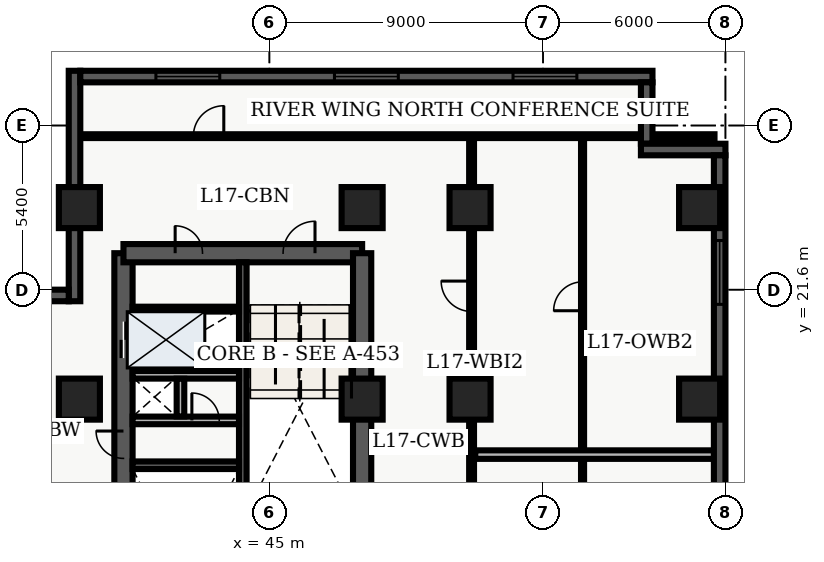
"""IFC4 building model, lengths in metres.
Left out: names, types, materials, properties, quantities, classifications, styles, units other than length and angle.
Written with IfcOpenShell. Run it as: python <this file> out.ifc"""

import sys

from ifc_helpers import new_model, entity, si_unit, converted_unit, direction, frame, origin_with_axes, origin_2d_with_axis, place, context, subcontext, project, spatial, polyline, rectangle, outline, extrude, element, fill, save


model = new_model("IFC4")
c1 = context("Model", 3, precision=1e-05, world=origin_with_axes(), true_north=direction((0.0, 1.0)))
c2 = subcontext(c1, "Body", "Model", "MODEL_VIEW")
j1 = project(units=[si_unit("LENGTHUNIT", "METRE"), converted_unit("PLANEANGLEUNIT", "DEGREE", entity("IfcPlaneAngleMeasure", 0.017), si_unit("PLANEANGLEUNIT", "RADIAN"), dimensions=[0, 0, 0, 0, 0, 0, 0])], contexts=[c1])
p1 = place(None, origin_with_axes())
s1 = spatial("IfcSite", under=j1, at=p1, CompositionType="ELEMENT")
p2 = place(p1, origin_with_axes())
s2 = spatial("IfcBuilding", under=s1, at=p2, CompositionType="ELEMENT")
p3 = place(p2, frame((0.0, 0.0, 71.7), z_axis=(0.0, 0.0, 1.0), x_axis=(1.0, 0.0, 0.0)))
s3 = spatial("IfcBuildingStorey", under=s2, at=p3, CompositionType="ELEMENT", Elevation=71.7)
p4 = place(p3, frame((40.2, 7.2, 0.0), z_axis=(0.0, 0.0, 1.0), x_axis=(0.0, 1.0, 0.0)))
e1 = element("IfcWall", 1, at=p4, inside=s3, PredefinedType="SHEAR", context=c2, shape_type="SweptSolid", body=[
    extrude(outline(polyline([(0.0, -0.3), (15.6, -0.3), (15.6, 0.3), (0.0, 0.3), (0.0, -0.3)])), origin_with_axes(), (0.0, 0.0, 1.0), 3.66),
])
p5 = place(p4, frame((12.75, 0.0, 0.0), z_axis=(0.0, 0.0, 1.0), x_axis=(1.0, 0.0, 0.0)))
e2 = element("IfcOpeningElement", 2, at=p5, cuts=e1, PredefinedType="OPENING", context=c2, shape_type="SweptSolid", body=[
    extrude(rectangle(XDim=1.2, YDim=0.62, at=origin_2d_with_axis()), origin_with_axes(), (0.0, 0.0, 1.0), 2.15),
])
p6 = place(p4, frame((9.3, 0.0, 0.0), z_axis=(0.0, 0.0, 1.0), x_axis=(1.0, 0.0, 0.0)))
e3 = element("IfcOpeningElement", 3, at=p6, cuts=e1, PredefinedType="OPENING", context=c2, shape_type="SweptSolid", body=[
    extrude(rectangle(XDim=0.9, YDim=0.62, at=origin_2d_with_axis()), origin_with_axes(), (0.0, 0.0, 1.0), 2.15),
])
p7 = place(p3, frame((40.2, 22.8, 0.0), z_axis=(0.0, 0.0, 1.0), x_axis=(1.0, 0.0, 0.0)))
e4 = element("IfcWall", 4, at=p7, inside=s3, PredefinedType="SHEAR", context=c2, shape_type="SweptSolid", body=[
    extrude(outline(polyline([(0.0, -0.3), (7.85, -0.3), (7.85, 0.3), (0.0, 0.3), (0.0, -0.3)])), origin_with_axes(), (0.0, 0.0, 1.0), 3.66),
])
p8 = place(p7, frame((5.775, 0.0, 0.0), z_axis=(0.0, 0.0, 1.0), x_axis=(1.0, 0.0, 0.0)))
e5 = element("IfcOpeningElement", 5, at=p8, cuts=e4, PredefinedType="OPENING", context=c2, shape_type="SweptSolid", body=[
    extrude(rectangle(XDim=1.05, YDim=0.62, at=origin_2d_with_axis()), origin_with_axes(), (0.0, 0.0, 1.0), 2.15),
])
p9 = place(p7, frame((2.15, 0.0, 0.0), z_axis=(0.0, 0.0, 1.0), x_axis=(1.0, 0.0, 0.0)))
e6 = element("IfcOpeningElement", 6, at=p9, cuts=e4, PredefinedType="OPENING", context=c2, shape_type="SweptSolid", body=[
    extrude(rectangle(XDim=0.9, YDim=0.62, at=origin_2d_with_axis()), origin_with_axes(), (0.0, 0.0, 1.0), 2.15),
])
p10 = place(p3, frame((48.05, 7.2, 0.0), z_axis=(0.0, 0.0, 1.0), x_axis=(0.0, 1.0, 0.0)))
e7 = element("IfcWall", 7, at=p10, inside=s3, PredefinedType="SHEAR", context=c2, shape_type="SweptSolid", body=[
    extrude(outline(polyline([(0.0, -0.3), (15.6, -0.3), (15.6, 0.3), (0.0, 0.3), (0.0, -0.3)])), origin_with_axes(), (0.0, 0.0, 1.0), 3.66),
])
p11 = place(p10, frame((1.425, 0.0, 0.0), z_axis=(0.0, 0.0, 1.0), x_axis=(1.0, 0.0, 0.0)))
e8 = element("IfcOpeningElement", 8, at=p11, cuts=e7, PredefinedType="OPENING", context=c2, shape_type="SweptSolid", body=[
    extrude(rectangle(XDim=1.05, YDim=0.62, at=origin_2d_with_axis()), origin_with_axes(), (0.0, 0.0, 1.0), 2.15),
])
p12 = place(p10, frame((3.475, 0.0, 0.0), z_axis=(0.0, 0.0, 1.0), x_axis=(1.0, 0.0, 0.0)))
e9 = element("IfcOpeningElement", 9, at=p12, cuts=e7, PredefinedType="OPENING", context=c2, shape_type="SweptSolid", body=[
    extrude(rectangle(XDim=1.05, YDim=0.62, at=origin_2d_with_axis()), origin_with_axes(), (0.0, 0.0, 1.0), 2.15),
])
p13 = place(p10, frame((5.625, 0.0, 0.0), z_axis=(0.0, 0.0, 1.0), x_axis=(1.0, 0.0, 0.0)))
e10 = element("IfcOpeningElement", 10, at=p13, cuts=e7, PredefinedType="OPENING", context=c2, shape_type="SweptSolid", body=[
    extrude(rectangle(XDim=0.95, YDim=0.62, at=origin_2d_with_axis()), origin_with_axes(), (0.0, 0.0, 1.0), 2.15),
])
p14 = place(p3, frame((44.125, 7.5, 0.0), z_axis=(0.0, 0.0, 1.0), x_axis=(0.0, 1.0, 0.0)))
e11 = element("IfcWall", 11, at=p14, inside=s3, PredefinedType="SHEAR", context=c2, shape_type="SweptSolid", body=[
    extrude(outline(polyline([(0.0, -0.125), (15.0, -0.125), (15.0, 0.125), (0.0, 0.125), (0.0, -0.125)])), origin_with_axes(), (0.0, 0.0, 1.0), 3.66),
])
p15 = place(p3, frame((40.5, 15.825, 0.0), z_axis=(0.0, 0.0, 1.0), x_axis=(1.0, 0.0, 0.0)))
e12 = element("IfcWall", 12, at=p15, inside=s3, PredefinedType="SHEAR", context=c2, shape_type="SweptSolid", body=[
    extrude(outline(polyline([(0.0, -0.125), (3.5, -0.125), (3.5, 0.125), (0.0, 0.125), (0.0, -0.125)])), origin_with_axes(), (0.0, 0.0, 1.0), 3.66),
])
p16 = place(p3, frame((40.5, 17.3, 0.0), z_axis=(0.0, 0.0, 1.0), x_axis=(1.0, 0.0, 0.0)))
e13 = element("IfcWall", 13, at=p16, inside=s3, PredefinedType="SOLIDWALL", context=c2, shape_type="SweptSolid", body=[
    extrude(outline(polyline([(0.0, -0.125), (3.5, -0.125), (3.5, 0.125), (0.0, 0.125), (0.0, -0.125)])), origin_with_axes(), (0.0, 0.0, 1.0), 2.7),
])
p17 = place(p16, frame((2.4, 0.0, 0.0), z_axis=(0.0, 0.0, 1.0), x_axis=(1.0, 0.0, 0.0)))
e14 = element("IfcOpeningElement", 14, at=p17, cuts=e13, PredefinedType="OPENING", context=c2, shape_type="SweptSolid", body=[
    extrude(rectangle(XDim=0.9, YDim=0.27, at=origin_2d_with_axis()), origin_with_axes(), (0.0, 0.0, 1.0), 2.15),
])
p18 = place(p3, frame((40.5, 18.8, 0.0), z_axis=(0.0, 0.0, 1.0), x_axis=(1.0, 0.0, 0.0)))
e15 = element("IfcWall", 15, at=p18, inside=s3, PredefinedType="SOLIDWALL", context=c2, shape_type="SweptSolid", body=[
    extrude(outline(polyline([(0.0, -0.125), (3.5, -0.125), (3.5, 0.125), (0.0, 0.125), (0.0, -0.125)])), origin_with_axes(), (0.0, 0.0, 1.0), 2.7),
])
p19 = place(p3, frame((42.075, 17.43, 0.0), z_axis=(0.0, 0.0, 1.0), x_axis=(0.0, 1.0, 0.0)))
e16 = element("IfcWall", 16, at=p19, inside=s3, PredefinedType="SOLIDWALL", context=c2, shape_type="SweptSolid", body=[
    extrude(outline(polyline([(0.0, -0.125), (1.24, -0.125), (1.24, 0.125), (0.0, 0.125), (0.0, -0.125)])), origin_with_axes(), (0.0, 0.0, 1.0), 2.7),
])
for number, where, z_axis, x_axis in (
    (17, (38.75, 18.0, 0.0), (0.0, 0.0, 1.0), (1.0, 0.0, 0.0)),
    (18, (38.75, 24.3, 0.0), (0.0, 0.0, 1.0), (1.0, 0.0, 0.0)),
    (19, (48.05, 18.0, 0.0), (0.0, 0.0, 1.0), (1.0, 0.0, 0.0)),
    (20, (48.05, 24.3, 0.0), (0.0, 0.0, 1.0), (1.0, 0.0, 0.0)),
    (21, (51.6, 18.0, 0.0), (0.0, 0.0, 1.0), (1.0, 0.0, 0.0)),
    (22, (51.6, 24.3, 0.0), (0.0, 0.0, 1.0), (1.0, 0.0, 0.0)),
    (23, (59.15, 18.0, 0.0), (0.0, 0.0, 1.0), (1.0, 0.0, 0.0)),
    (24, (59.15, 24.3, 0.0), (0.0, 0.0, 1.0), (1.0, 0.0, 0.0)),
):
    element("IfcColumn", number, at=place(p3, frame(where, z_axis=z_axis, x_axis=x_axis)), inside=s3, PredefinedType="COLUMN", context=c2, shape_type="SweptSolid", body=[
        extrude(rectangle(XDim=1.35, YDim=1.35, at=origin_2d_with_axis()), origin_with_axes(), (0.0, 0.0, 1.0), 3.9),
    ])
p20 = place(p3, frame((40.5, 20.96, 0.0), z_axis=(0.0, 0.0, 1.0), x_axis=(1.0, 0.0, 0.0)))
e25 = element("IfcWall", 25, at=p20, inside=s3, PredefinedType="PARTITIONING", context=c2, shape_type="SweptSolid", body=[
    extrude(outline(polyline([(0.0, -0.08), (3.5, -0.08), (3.5, 0.08), (0.0, 0.08), (0.0, -0.08)])), origin_with_axes(), (0.0, 0.0, 1.0), 2.7),
])
p21 = place(p3, frame((51.65, 7.85, 0.0), z_axis=(0.0, 0.0, 1.0), x_axis=(0.0, 1.0, 0.0)))
e26 = element("IfcWall", 26, at=p21, inside=s3, PredefinedType="PARTITIONING", context=c2, shape_type="SweptSolid", body=[
    extrude(outline(polyline([(0.0, -0.08), (18.8, -0.08), (18.8, 0.08), (0.0, 0.08), (0.0, -0.08)])), origin_with_axes(), (0.0, 0.0, 1.0), 2.7),
])
p22 = place(p21, frame((4.473, 0.0, 0.0), z_axis=(0.0, 0.0, 1.0), x_axis=(1.0, 0.0, 0.0)))
e27 = element("IfcOpeningElement", 27, at=p22, cuts=e26, PredefinedType="OPENING", context=c2, shape_type="SweptSolid", body=[
    extrude(rectangle(XDim=1.0, YDim=0.18, at=origin_2d_with_axis()), origin_with_axes(), (0.0, 0.0, 1.0), 2.15),
])
p23 = place(p21, frame((13.533, 0.0, 0.0), z_axis=(0.0, 0.0, 1.0), x_axis=(1.0, 0.0, 0.0)))
e28 = element("IfcOpeningElement", 28, at=p23, cuts=e26, PredefinedType="OPENING", context=c2, shape_type="SweptSolid", body=[
    extrude(rectangle(XDim=1.0, YDim=0.18, at=origin_2d_with_axis()), origin_with_axes(), (0.0, 0.0, 1.0), 2.15),
])
p24 = place(p3, frame((38.76, 26.65, 0.0), z_axis=(0.0, 0.0, 1.0), x_axis=(1.0, 0.0, 0.0)))
e29 = element("IfcWall", 29, at=p24, inside=s3, PredefinedType="PARTITIONING", context=c2, shape_type="SweptSolid", body=[
    extrude(outline(polyline([(0.0, -0.062), (20.88, -0.062), (20.88, 0.062), (0.0, 0.062), (0.0, -0.062)])), origin_with_axes(), (0.0, 0.0, 1.0), 2.7),
])
p25 = place(p24, frame((4.24, 0.0, 0.0), z_axis=(0.0, 0.0, 1.0), x_axis=(1.0, 0.0, 0.0)))
e30 = element("IfcOpeningElement", 30, at=p25, cuts=e29, PredefinedType="OPENING", context=c2, shape_type="SweptSolid", body=[
    extrude(rectangle(XDim=1.0, YDim=0.145, at=origin_2d_with_axis()), origin_with_axes(), (0.0, 0.0, 1.0), 2.15),
])
p26 = place(p3, frame((55.3, 7.98, 0.0), z_axis=(0.0, 0.0, 1.0), x_axis=(0.0, 1.0, 0.0)))
e31 = element("IfcWall", 31, at=p26, inside=s3, PredefinedType="PARTITIONING", context=c2, shape_type="SweptSolid", body=[
    extrude(outline(polyline([(0.0, -0.05), (18.54, -0.05), (18.54, 0.05), (0.0, 0.05), (0.0, -0.05)])), origin_with_axes(), (0.0, 0.0, 1.0), 2.7),
])
p27 = place(p26, frame((4.062, 0.0, 0.0), z_axis=(0.0, 0.0, 1.0), x_axis=(1.0, 0.0, 0.0)))
e32 = element("IfcOpeningElement", 32, at=p27, cuts=e31, PredefinedType="OPENING", context=c2, shape_type="SweptSolid", body=[
    extrude(rectangle(XDim=0.95, YDim=0.12, at=origin_2d_with_axis()), origin_with_axes(), (0.0, 0.0, 1.0), 2.15),
])
p28 = place(p26, frame((13.402, 0.0, 0.0), z_axis=(0.0, 0.0, 1.0), x_axis=(1.0, 0.0, 0.0)))
e33 = element("IfcOpeningElement", 33, at=p28, cuts=e31, PredefinedType="OPENING", context=c2, shape_type="SweptSolid", body=[
    extrude(rectangle(XDim=0.95, YDim=0.12, at=origin_2d_with_axis()), origin_with_axes(), (0.0, 0.0, 1.0), 2.15),
])
p29 = place(p3, frame((51.77, 16.175, 0.0), z_axis=(0.0, 0.0, 1.0), x_axis=(1.0, 0.0, 0.0)))
e34 = element("IfcWall", 34, at=p29, inside=s3, PredefinedType="PARTITIONING", context=c2, shape_type="SweptSolid", body=[
    extrude(outline(polyline([(0.0, -0.14), (7.855, -0.14), (7.855, 0.14), (0.0, 0.14), (0.0, -0.14)])), origin_with_axes(), (0.0, 0.0, 1.0), 2.7),
])
p30 = place(p3, frame((38.59, 21.22, 0.0), z_axis=(0.0, 0.0, 1.0), x_axis=(0.0, 1.0, 0.0)))
e35 = element("IfcWall", 35, at=p30, inside=s3, PredefinedType="SOLIDWALL", context=c2, shape_type="SweptSolid", body=[
    extrude(outline(polyline([(0.0, -0.19), (7.58, -0.19), (7.58, 0.19), (0.0, 0.19), (0.0, -0.19)])), origin_with_axes(), (0.0, 0.0, 1.0), 3.66),
])
p31 = place(p3, frame((38.78, 28.61, 0.0), z_axis=(0.0, 0.0, 1.0), x_axis=(1.0, 0.0, 0.0)))
e36 = element("IfcWall", 36, at=p31, inside=s3, PredefinedType="SOLIDWALL", context=c2, shape_type="SweptSolid", body=[
    extrude(outline(polyline([(0.0, -0.19), (18.82, -0.19), (18.82, 0.19), (0.0, 0.19), (0.0, -0.19)])), origin_with_axes(), (0.0, 0.0, 1.0), 3.66),
])
p32 = place(p31, frame((3.537, 0.0, 0.45), z_axis=(0.0, 0.0, 1.0), x_axis=(1.0, 0.0, 0.0)))
e37 = element("IfcOpeningElement", 37, at=p32, cuts=e36, PredefinedType="OPENING", context=c2, shape_type="SweptSolid", body=[
    extrude(rectangle(XDim=2.1, YDim=0.4, at=origin_2d_with_axis()), origin_with_axes(), (0.0, 0.0, 1.0), 2.2),
])
p33 = place(p31, frame((9.41, 0.0, 0.45), z_axis=(0.0, 0.0, 1.0), x_axis=(1.0, 0.0, 0.0)))
e38 = element("IfcOpeningElement", 38, at=p33, cuts=e36, PredefinedType="OPENING", context=c2, shape_type="SweptSolid", body=[
    extrude(rectangle(XDim=2.1, YDim=0.4, at=origin_2d_with_axis()), origin_with_axes(), (0.0, 0.0, 1.0), 2.2),
])
p34 = place(p31, frame((15.283, 0.0, 0.45), z_axis=(0.0, 0.0, 1.0), x_axis=(1.0, 0.0, 0.0)))
e39 = element("IfcOpeningElement", 39, at=p34, cuts=e36, PredefinedType="OPENING", context=c2, shape_type="SweptSolid", body=[
    extrude(rectangle(XDim=2.1, YDim=0.4, at=origin_2d_with_axis()), origin_with_axes(), (0.0, 0.0, 1.0), 2.2),
])
p35 = place(p3, frame((57.41, 28.42, 0.0), z_axis=(0.0, 0.0, 1.0), x_axis=(0.0, -1.0, 0.0)))
e40 = element("IfcWall", 40, at=p35, inside=s3, PredefinedType="SOLIDWALL", context=c2, shape_type="SweptSolid", body=[
    extrude(outline(polyline([(0.0, -0.19), (2.02, -0.19), (2.02, 0.19), (0.0, 0.19), (0.0, -0.19)])), origin_with_axes(), (0.0, 0.0, 1.0), 3.66),
])
p36 = place(p3, frame((57.22, 26.21, 0.0), z_axis=(0.0, 0.0, 1.0), x_axis=(1.0, 0.0, 0.0)))
e41 = element("IfcWall", 41, at=p36, inside=s3, PredefinedType="SOLIDWALL", context=c2, shape_type="SweptSolid", body=[
    extrude(outline(polyline([(0.0, -0.19), (2.78, -0.19), (2.78, 0.19), (0.0, 0.19), (0.0, -0.19)])), origin_with_axes(), (0.0, 0.0, 1.0), 3.66),
])
p37 = place(p3, frame((59.81, 26.02, 0.0), z_axis=(0.0, 0.0, 1.0), x_axis=(0.0, -1.0, 0.0)))
e42 = element("IfcWall", 42, at=p37, inside=s3, PredefinedType="SOLIDWALL", context=c2, shape_type="SweptSolid", body=[
    extrude(outline(polyline([(0.0, -0.19), (23.62, -0.19), (23.62, 0.19), (0.0, 0.19), (0.0, -0.19)])), origin_with_axes(), (0.0, 0.0, 1.0), 3.66),
])
p38 = place(p37, frame((3.853, 0.0, 0.45), z_axis=(0.0, 0.0, 1.0), x_axis=(1.0, 0.0, 0.0)))
e43 = element("IfcOpeningElement", 43, at=p38, cuts=e42, PredefinedType="OPENING", context=c2, shape_type="SweptSolid", body=[
    extrude(rectangle(XDim=2.1, YDim=0.4, at=origin_2d_with_axis()), origin_with_axes(), (0.0, 0.0, 1.0), 2.2),
])
p39 = place(p37, frame((20.218, 0.0, 0.45), z_axis=(0.0, 0.0, 1.0), x_axis=(1.0, 0.0, 0.0)))
e44 = element("IfcOpeningElement", 44, at=p39, cuts=e42, PredefinedType="OPENING", context=c2, shape_type="SweptSolid", body=[
    extrude(rectangle(XDim=2.1, YDim=0.4, at=origin_2d_with_axis()), origin_with_axes(), (0.0, 0.0, 1.0), 2.2),
])
p40 = place(p3, frame((21.22, 21.41, 0.0), z_axis=(0.0, 0.0, 1.0), x_axis=(1.0, 0.0, 0.0)))
e45 = element("IfcWall", 45, at=p40, inside=s3, PredefinedType="SOLIDWALL", context=c2, shape_type="SweptSolid", body=[
    extrude(outline(polyline([(0.0, -0.19), (17.18, -0.19), (17.18, 0.19), (0.0, 0.19), (0.0, -0.19)])), origin_with_axes(), (0.0, 0.0, 1.0), 3.66),
])
p41 = place(p40, frame((8.59, 0.0, 0.45), z_axis=(0.0, 0.0, 1.0), x_axis=(1.0, 0.0, 0.0)))
e46 = element("IfcOpeningElement", 46, at=p41, cuts=e45, PredefinedType="OPENING", context=c2, shape_type="SweptSolid", body=[
    extrude(rectangle(XDim=2.1, YDim=0.4, at=origin_2d_with_axis()), origin_with_axes(), (0.0, 0.0, 1.0), 2.2),
])
p42 = place(p40, frame((13.467, 0.0, 0.45), z_axis=(0.0, 0.0, 1.0), x_axis=(1.0, 0.0, 0.0)))
e47 = element("IfcOpeningElement", 47, at=p42, cuts=e45, PredefinedType="OPENING", context=c2, shape_type="SweptSolid", body=[
    extrude(rectangle(XDim=2.1, YDim=0.4, at=origin_2d_with_axis()), origin_with_axes(), (0.0, 0.0, 1.0), 2.2),
])
p43 = place(p4, frame((12.75, 0.0, 0.0), z_axis=(0.0, 0.0, 1.0), x_axis=(1.0, 0.0, 0.0)))
e48 = element("IfcDoor", 48, at=p43, inside=s3, OperationType="DOUBLE_DOOR_SLIDING", PredefinedType="DOOR", context=c2, shape_type="SweptSolid", body=[
    extrude(rectangle(XDim=1.2, YDim=0.09, at=origin_2d_with_axis()), origin_with_axes(), (0.0, 0.0, 1.0), 2.15),
])
fill(e2, e48)
p44 = place(p4, frame((9.3, 0.0, 0.0), z_axis=(0.0, 0.0, 1.0), x_axis=(1.0, 0.0, 0.0)))
e49 = element("IfcDoor", 49, at=p44, inside=s3, OperationType="SINGLE_SWING_RIGHT", PredefinedType="DOOR", context=c2, shape_type="SweptSolid", body=[
    extrude(rectangle(XDim=0.9, YDim=0.09, at=origin_2d_with_axis()), origin_with_axes(), (0.0, 0.0, 1.0), 2.15),
])
fill(e3, e49)
p45 = place(p16, frame((2.4, 0.0, 0.0), z_axis=(0.0, 0.0, 1.0), x_axis=(1.0, 0.0, 0.0)))
e50 = element("IfcDoor", 50, at=p45, inside=s3, OperationType="SINGLE_SWING_LEFT", PredefinedType="DOOR", context=c2, shape_type="SweptSolid", body=[
    extrude(rectangle(XDim=0.9, YDim=0.09, at=origin_2d_with_axis()), origin_with_axes(), (0.0, 0.0, 1.0), 2.15),
])
fill(e14, e50)
p46 = place(p7, frame((5.775, 0.0, 0.0), z_axis=(0.0, 0.0, 1.0), x_axis=(1.0, 0.0, 0.0)))
e51 = element("IfcDoor", 51, at=p46, inside=s3, OperationType="SINGLE_SWING_RIGHT", PredefinedType="DOOR", context=c2, shape_type="SweptSolid", body=[
    extrude(rectangle(XDim=1.05, YDim=0.09, at=origin_2d_with_axis()), origin_with_axes(), (0.0, 0.0, 1.0), 2.15),
])
fill(e5, e51)
p47 = place(p7, frame((2.15, 0.0, 0.0), z_axis=(0.0, 0.0, 1.0), x_axis=(1.0, 0.0, 0.0)))
e52 = element("IfcDoor", 52, at=p47, inside=s3, OperationType="SINGLE_SWING_LEFT", PredefinedType="DOOR", context=c2, shape_type="SweptSolid", body=[
    extrude(rectangle(XDim=0.9, YDim=0.09, at=origin_2d_with_axis()), origin_with_axes(), (0.0, 0.0, 1.0), 2.15),
])
fill(e6, e52)
p48 = place(p24, frame((4.24, 0.0, 0.0), z_axis=(0.0, 0.0, 1.0), x_axis=(1.0, 0.0, 0.0)))
e53 = element("IfcDoor", 53, at=p48, inside=s3, OperationType="SINGLE_SWING_RIGHT", PredefinedType="DOOR", context=c2, shape_type="SweptSolid", body=[
    extrude(rectangle(XDim=1.0, YDim=0.075, at=origin_2d_with_axis()), origin_with_axes(), (0.0, 0.0, 1.0), 2.15),
])
fill(e30, e53)
p49 = place(p26, frame((13.402, 0.0, 0.0), z_axis=(0.0, 0.0, 1.0), x_axis=(1.0, 0.0, 0.0)))
e54 = element("IfcDoor", 54, at=p49, inside=s3, OperationType="SINGLE_SWING_LEFT", PredefinedType="DOOR", context=c2, shape_type="SweptSolid", body=[
    extrude(rectangle(XDim=0.95, YDim=0.06, at=origin_2d_with_axis()), origin_with_axes(), (0.0, 0.0, 1.0), 2.15),
])
fill(e33, e54)
p50 = place(p21, frame((13.533, 0.0, 0.0), z_axis=(0.0, 0.0, 1.0), x_axis=(1.0, 0.0, 0.0)))
e55 = element("IfcDoor", 55, at=p50, inside=s3, OperationType="SINGLE_SWING_RIGHT", PredefinedType="DOOR", context=c2, shape_type="SweptSolid", body=[
    extrude(rectangle(XDim=1.0, YDim=0.09, at=origin_2d_with_axis()), origin_with_axes(), (0.0, 0.0, 1.0), 2.15),
])
fill(e28, e55)
p51 = place(p31, frame((3.537, 0.0, 0.45), z_axis=(0.0, 0.0, 1.0), x_axis=(1.0, 0.0, 0.0)))
e56 = element("IfcWindow", 56, at=p51, inside=s3, PredefinedType="WINDOW", context=c2, shape_type="SweptSolid", body=[
    extrude(rectangle(XDim=2.1, YDim=0.09, at=origin_2d_with_axis()), origin_with_axes(), (0.0, 0.0, 1.0), 2.2),
])
fill(e37, e56)
p52 = place(p31, frame((9.41, 0.0, 0.45), z_axis=(0.0, 0.0, 1.0), x_axis=(1.0, 0.0, 0.0)))
e57 = element("IfcWindow", 57, at=p52, inside=s3, PredefinedType="WINDOW", context=c2, shape_type="SweptSolid", body=[
    extrude(rectangle(XDim=2.1, YDim=0.09, at=origin_2d_with_axis()), origin_with_axes(), (0.0, 0.0, 1.0), 2.2),
])
fill(e38, e57)
p53 = place(p31, frame((15.283, 0.0, 0.45), z_axis=(0.0, 0.0, 1.0), x_axis=(1.0, 0.0, 0.0)))
e58 = element("IfcWindow", 58, at=p53, inside=s3, PredefinedType="WINDOW", context=c2, shape_type="SweptSolid", body=[
    extrude(rectangle(XDim=2.1, YDim=0.09, at=origin_2d_with_axis()), origin_with_axes(), (0.0, 0.0, 1.0), 2.2),
])
fill(e39, e58)
p54 = place(p37, frame((3.853, 0.0, 0.45), z_axis=(0.0, 0.0, 1.0), x_axis=(1.0, 0.0, 0.0)))
e59 = element("IfcWindow", 59, at=p54, inside=s3, PredefinedType="WINDOW", context=c2, shape_type="SweptSolid", body=[
    extrude(rectangle(XDim=2.1, YDim=0.09, at=origin_2d_with_axis()), origin_with_axes(), (0.0, 0.0, 1.0), 2.2),
])
fill(e43, e59)
save(model, sys.argv[1])
